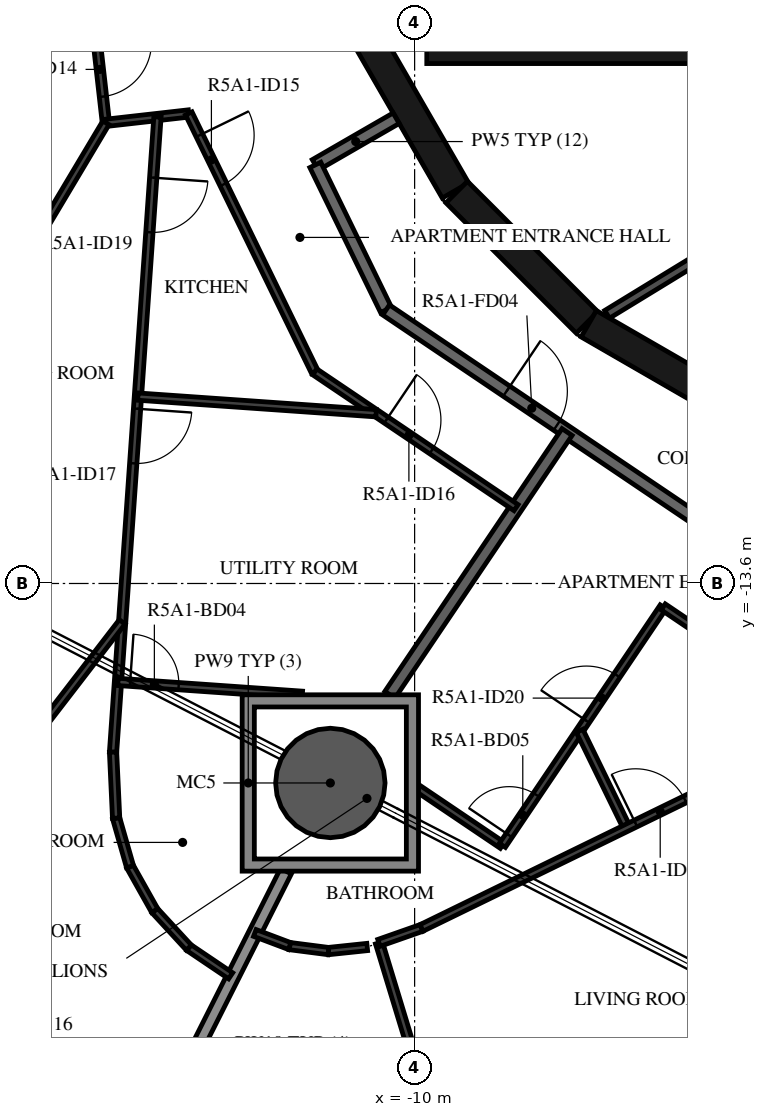
"""IFC4 building model, lengths in metres.
Left out: names, types, materials, properties, quantities, classifications, styles, units other than length and angle.
Written with IfcOpenShell. Run it as: python <this file> out.ifc"""

import sys

from ifc_helpers import new_model, si_unit, direction, frame, frame_2d, origin, origin_2d, place, context, subcontext, project, spatial, polyline, rectangle, hollow_circle, outline, extrude, element, fill, save


model = new_model("IFC4")
c1 = context("Model", 3, precision=1e-05, world=origin(), true_north=direction((0.0, 1.0)))
c2 = subcontext(c1, "Body", "Model", "MODEL_VIEW")
j1 = project(units=[si_unit("LENGTHUNIT", "METRE"), si_unit("PLANEANGLEUNIT", "RADIAN")], contexts=[c1])
p1 = place(None, origin())
s1 = spatial("IfcSite", under=j1, at=p1, CompositionType="ELEMENT")
p2 = place(p1, origin())
s2 = spatial("IfcBuilding", under=s1, at=p2, CompositionType="ELEMENT")
p3 = place(p2, frame((0.0, 0.0, 191.9)))
s3 = spatial("IfcBuildingStorey", under=s2, at=p3, CompositionType="ELEMENT", Elevation=191.9)
p4 = place(p3, frame((-11.386, -16.881, -0.38), z_axis=(0.0, 0.0, 1.0), x_axis=(1.0, 0.0, 0.0)))
e1 = element("IfcColumn", 1, at=p4, inside=s3, PredefinedType="COLUMN", context=c2, shape_type="SweptSolid", body=[
    extrude(hollow_circle(Radius=0.9, WallThickness=0.04, at=origin_2d()), origin(), (0.0, 0.0, 1.0), 3.5),
])
p5 = place(p3, frame((-10.845, -4.51, 0.0), z_axis=(0.0, 0.0, 1.0), x_axis=(0.500087131594, -0.865975092491, 0.0)))
e2 = element("IfcWall", 2, at=p5, inside=s3, PredefinedType="SHEAR", context=c2, shape_type="SweptSolid", body=[
    extrude(rectangle(XDim=3.033, YDim=0.5, at=frame_2d((1.516, 0.0))), origin(), (0.0, 0.0, 1.0), 3.12),
])
p6 = place(p3, frame((-9.308, -7.164, 0.0), z_axis=(0.0, 0.0, 1.0), x_axis=(0.707106781187, -0.707106781187, 0.0)))
e3 = element("IfcWall", 3, at=p6, inside=s3, PredefinedType="SHEAR", context=c2, shape_type="SweptSolid", body=[
    extrude(rectangle(XDim=3.032, YDim=0.5, at=frame_2d((1.516, 0.0))), origin(), (0.0, 0.0, 1.0), 3.12),
])
p7 = place(p3, frame((-7.137, -9.329, 0.0), z_axis=(0.0, 0.0, 1.0), x_axis=(0.865975092491, -0.500087131594, 0.0)))
e4 = element("IfcWall", 4, at=p7, inside=s3, PredefinedType="SHEAR", context=c2, shape_type="SweptSolid", body=[
    extrude(rectangle(XDim=3.033, YDim=0.5, at=frame_2d((1.516, 0.0))), origin(), (0.0, 0.0, 1.0), 3.12),
])
p8 = place(p3, origin())
e5 = element("IfcWall", 5, at=p8, inside=s3, PredefinedType="SHEAR", context=c2, shape_type="SweptSolid", body=[
    extrude(outline(polyline([(9.8, -5.05), (9.8, -4.8), (9.8, -1.9), (9.55, -1.9), (9.55, -4.8), (7.65, -4.8), (7.65, -1.9), (7.4, -1.9), (7.4, -4.8), (5.5, -4.8), (5.5, -1.9), (5.25, -1.9), (5.25, -4.8), (3.35, -4.8), (3.35, -1.9), (3.1, -1.9), (3.1, -4.8), (1.2, -4.8), (1.2, -1.9), (0.95, -1.9), (0.95, -4.8), (-0.95, -4.8), (-0.95, -1.9), (-1.2, -1.9), (-1.2, -4.8), (-3.1, -4.8), (-3.1, -1.9), (-3.35, -1.9), (-3.35, -4.8), (-5.25, -4.8), (-5.25, -1.9), (-5.5, -1.9), (-5.5, -4.8), (-7.4, -4.8), (-7.4, -1.9), (-7.65, -1.9), (-7.65, -4.8), (-9.55, -4.8), (-9.55, -1.9), (-9.8, -1.9), (-9.8, -4.8), (-9.8, -5.05), (9.8, -5.05)])), origin(), (0.0, 0.0, 1.0), 3.12),
])
p9 = place(p3, frame((-2.451, -6.495, 0.0), z_axis=(0.0, 0.0, 1.0), x_axis=(-0.853250115418, -0.521501908471, 0.0)))
e6 = element("IfcWall", 6, at=p9, inside=s3, PredefinedType="PARTITIONING", context=c2, shape_type="SweptSolid", body=[
    extrude(rectangle(XDim=5.137, YDim=0.15, at=frame_2d((2.569, 0.0))), origin(), (0.0, 0.0, 1.0), 3.12),
])
p10 = place(p9, frame((2.119, 0.0, 0.0)))
e7 = element("IfcOpeningElement", 7, at=p10, cuts=e6, PredefinedType="OPENING", context=c2, shape_type="SweptSolid", body=[
    extrude(rectangle(XDim=0.9, YDim=2.1, at=frame_2d((0.45, 1.05))), frame((0.0, 0.085, 0.0), z_axis=(0.0, -1.0, 0.0), x_axis=(1.0, 0.0, 0.0)), (0.0, 0.0, 1.0), 0.17),
])
p11 = place(p3, frame((-10.303, -5.949, 0.0), z_axis=(0.0, 0.0, 1.0), x_axis=(-0.866042588199, -0.499970234539, 0.0)))
e8 = element("IfcWall", 8, at=p11, inside=s3, PredefinedType="STANDARD", context=c2, shape_type="SweptSolid", body=[
    extrude(rectangle(XDim=1.535, YDim=0.2, at=frame_2d((0.768, 0.0))), origin(), (0.0, 0.0, 1.0), 3.12),
])
p12 = place(p3, frame((-11.633, -6.716, 0.0), z_axis=(0.0, 0.0, 1.0), x_axis=(0.438322116278, -0.898817958422, 0.0)))
e9 = element("IfcWall", 9, at=p12, inside=s3, PredefinedType="STANDARD", context=c2, shape_type="SweptSolid", body=[
    extrude(rectangle(XDim=2.654, YDim=0.2, at=frame_2d((1.327, 0.0))), origin(), (0.0, 0.0, 1.0), 3.12),
])
p13 = place(p3, frame((-10.47, -9.101, 0.0), z_axis=(0.0, 0.0, 1.0), x_axis=(0.829035841718, -0.559195469534, 0.0)))
e10 = element("IfcWall", 10, at=p13, inside=s3, PredefinedType="STANDARD", context=c2, shape_type="SweptSolid", body=[
    extrude(rectangle(XDim=7.181, YDim=0.2, at=frame_2d((3.591, 0.0))), origin(), (0.0, 0.0, 1.0), 3.12),
])
p14 = place(p13, frame((2.39, 0.0, 0.0)))
e11 = element("IfcOpeningElement", 11, at=p14, cuts=e10, PredefinedType="OPENING", context=c2, shape_type="SweptSolid", body=[
    extrude(rectangle(XDim=1.0, YDim=2.1, at=frame_2d((0.5, 1.05))), frame((0.0, 0.11, 0.0), z_axis=(0.0, -1.0, 0.0), x_axis=(1.0, 0.0, 0.0)), (0.0, 0.0, 1.0), 0.22),
])
p15 = place(p3, frame((-10.407, -15.43, 0.0), z_axis=(0.0, 0.0, 1.0), x_axis=(0.559038328133, 0.829141813973, 0.0)))
e12 = element("IfcWall", 12, at=p15, inside=s3, PredefinedType="STANDARD", context=c2, shape_type="SweptSolid", body=[
    extrude(rectangle(XDim=5.212, YDim=0.2, at=frame_2d((2.606, 0.0))), origin(), (0.0, 0.0, 1.0), 3.12),
])
p16 = place(p3, frame((-14.979, -24.017, 0.0), z_axis=(0.0, 0.0, 1.0), x_axis=(0.449711952388, 0.893173644864, 0.0)))
e13 = element("IfcWall", 13, at=p16, inside=s3, PredefinedType="STANDARD", context=c2, shape_type="SweptSolid", body=[
    extrude(rectangle(XDim=6.367, YDim=0.2, at=frame_2d((3.184, 0.0))), origin(), (0.0, 0.0, 1.0), 2.73),
])
p17 = place(p3, frame((-15.25, -4.5, 0.0), z_axis=(0.0, 0.0, 1.0), x_axis=(0.1124919794, -0.99365263275, 0.0)))
e14 = element("IfcWall", 14, at=p17, inside=s3, PredefinedType="PARTITIONING", context=c2, shape_type="SweptSolid", body=[
    extrude(rectangle(XDim=1.534, YDim=0.12, at=frame_2d((0.767, 0.0))), origin(), (0.0, 0.0, 1.0), 3.12),
])
p18 = place(p17, frame((0.2, 0.0, 0.0)))
e15 = element("IfcOpeningElement", 15, at=p18, cuts=e14, PredefinedType="OPENING", context=c2, shape_type="SweptSolid", body=[
    extrude(rectangle(XDim=0.9, YDim=2.1, at=frame_2d((0.45, 1.05))), frame((0.0, 0.07, 0.0), z_axis=(0.0, -1.0, 0.0), x_axis=(1.0, 0.0, 0.0)), (0.0, 0.0, 1.0), 0.14),
])
p19 = place(p3, frame((-15.077, -6.025, 0.0), z_axis=(0.0, 0.0, 1.0), x_axis=(0.993646958109, 0.112542092746, 0.0)))
e16 = element("IfcWall", 16, at=p19, inside=s3, PredefinedType="PARTITIONING", context=c2, shape_type="SweptSolid", body=[
    extrude(rectangle(XDim=1.371, YDim=0.12, at=frame_2d((0.686, 0.0))), origin(), (0.0, 0.0, 1.0), 3.12),
])
p20 = place(p3, frame((-13.715, -5.87, 0.0), z_axis=(0.0, 0.0, 1.0), x_axis=(0.438372766482, -0.89879325632, 0.0)))
e17 = element("IfcWall", 17, at=p20, inside=s3, PredefinedType="PARTITIONING", context=c2, shape_type="SweptSolid", body=[
    extrude(rectangle(XDim=4.728, YDim=0.12, at=frame_2d((2.364, 0.0))), origin(), (0.0, 0.0, 1.0), 3.12),
])
p21 = place(p20, frame((0.4, 0.0, 0.0)))
e18 = element("IfcOpeningElement", 18, at=p21, cuts=e17, PredefinedType="OPENING", context=c2, shape_type="SweptSolid", body=[
    extrude(rectangle(XDim=0.9, YDim=2.1, at=frame_2d((0.45, 1.05))), frame((0.0, 0.07, 0.0), z_axis=(0.0, -1.0, 0.0), x_axis=(1.0, 0.0, 0.0)), (0.0, 0.0, 1.0), 0.14),
])
p22 = place(p3, frame((-11.642, -10.12, 0.0), z_axis=(0.0, 0.0, 1.0), x_axis=(0.829018066952, -0.559221820629, 0.0)))
e19 = element("IfcWall", 19, at=p22, inside=s3, PredefinedType="PARTITIONING", context=c2, shape_type="SweptSolid", body=[
    extrude(rectangle(XDim=3.992, YDim=0.12, at=frame_2d((1.996, 0.0))), origin(), (0.0, 0.0, 1.0), 3.12),
])
p23 = place(p22, frame((1.417, 0.0, 0.0)))
e20 = element("IfcOpeningElement", 20, at=p23, cuts=e19, PredefinedType="OPENING", context=c2, shape_type="SweptSolid", body=[
    extrude(rectangle(XDim=0.9, YDim=2.1, at=frame_2d((0.45, 1.05))), frame((0.0, 0.07, 0.0), z_axis=(0.0, -1.0, 0.0), x_axis=(1.0, 0.0, 0.0)), (0.0, 0.0, 1.0), 0.14),
])
p24 = place(p3, frame((-19.156, -12.863, 0.0), z_axis=(0.0, 0.0, 1.0), x_axis=(0.512316386407, 0.858796786335, 0.0)))
e21 = element("IfcWall", 21, at=p24, inside=s3, PredefinedType="PARTITIONING", context=c2, shape_type="SweptSolid", body=[
    extrude(rectangle(XDim=7.963, YDim=0.12, at=frame_2d((3.981, 0.0))), origin(), (0.0, 0.0, 1.0), 3.12),
])
p25 = place(p3, frame((-14.229, -5.929, 0.0), z_axis=(0.0, 0.0, 1.0), x_axis=(-0.069740723375, -0.997565151508, 0.0)))
e22 = element("IfcWall", 22, at=p25, inside=s3, PredefinedType="PARTITIONING", context=c2, shape_type="SweptSolid", body=[
    extrude(rectangle(XDim=10.47, YDim=0.12, at=frame_2d((5.235, 0.0))), origin(), (0.0, 0.0, 1.0), 3.12),
])
p26 = place(p25, frame((4.809, 0.0, 0.0)))
e23 = element("IfcOpeningElement", 23, at=p26, cuts=e22, PredefinedType="OPENING", context=c2, shape_type="SweptSolid", body=[
    extrude(rectangle(XDim=0.9, YDim=2.1, at=frame_2d((0.45, 1.05))), frame((0.0, 0.07, 0.0), z_axis=(0.0, -1.0, 0.0), x_axis=(1.0, 0.0, 0.0)), (0.0, 0.0, 1.0), 0.14),
])
p27 = place(p25, frame((1.0, 0.0, 0.0)))
e24 = element("IfcOpeningElement", 24, at=p27, cuts=e22, PredefinedType="OPENING", context=c2, shape_type="SweptSolid", body=[
    extrude(rectangle(XDim=0.9, YDim=2.1, at=frame_2d((0.45, 1.05))), frame((0.0, 0.07, 0.0), z_axis=(0.0, -1.0, 0.0), x_axis=(1.0, 0.0, 0.0)), (0.0, 0.0, 1.0), 0.14),
])
p28 = place(p3, frame((-14.551, -10.527, 0.0), z_axis=(0.0, 0.0, 1.0), x_axis=(0.997564247633, -0.069753651118, 0.0)))
e25 = element("IfcWall", 25, at=p28, inside=s3, PredefinedType="PARTITIONING", context=c2, shape_type="SweptSolid", body=[
    extrude(rectangle(XDim=3.927, YDim=0.12, at=frame_2d((1.963, 0.0))), origin(), (0.0, 0.0, 1.0), 3.12),
])
p29 = place(p3, frame((-18.892, -19.531, 0.0), z_axis=(0.0, 0.0, 1.0), x_axis=(0.610326128317, 0.792150249065, 0.0)))
e26 = element("IfcWall", 26, at=p29, inside=s3, PredefinedType="PARTITIONING", context=c2, shape_type="SweptSolid", body=[
    extrude(rectangle(XDim=6.689, YDim=0.12, at=frame_2d((3.345, 0.0))), origin(), (0.0, 0.0, 1.0), 3.12),
])
p30 = place(p29, frame((0.6, 0.0, 0.0)))
e27 = element("IfcOpeningElement", 27, at=p30, cuts=e26, PredefinedType="OPENING", context=c2, shape_type="SweptSolid", body=[
    extrude(rectangle(XDim=0.9, YDim=2.1, at=frame_2d((0.45, 1.05))), frame((0.0, 0.07, 0.0), z_axis=(0.0, -1.0, 0.0), x_axis=(1.0, 0.0, 0.0)), (0.0, 0.0, 1.0), 0.14),
])
p31 = place(p3, frame((-14.879, -15.219, 0.0), z_axis=(0.0, 0.0, 1.0), x_axis=(0.997566012813, -0.069728402248, 0.0)))
e28 = element("IfcWall", 28, at=p31, inside=s3, PredefinedType="PARTITIONING", context=c2, shape_type="SweptSolid", body=[
    extrude(rectangle(XDim=3.039, YDim=0.12, at=frame_2d((1.52, 0.0))), origin(), (0.0, 0.0, 1.0), 3.12),
])
p32 = place(p31, frame((0.2, 0.0, 0.0)))
e29 = element("IfcOpeningElement", 29, at=p32, cuts=e28, PredefinedType="OPENING", context=c2, shape_type="SweptSolid", body=[
    extrude(rectangle(XDim=0.8, YDim=2.1, at=frame_2d((0.4, 1.05))), frame((0.0, 0.07, 0.0), z_axis=(0.0, -1.0, 0.0), x_axis=(1.0, 0.0, 0.0)), (0.0, 0.0, 1.0), 0.14),
])
for number, where, z_axis, x_axis in (
    (30, (-13.025, -20.052, 0.0), (0.0, 0.0, 1.0), (-0.829, 0.559, 0.0)),
    (31, (-13.712, -19.588, 0.0), (0.0, 0.0, 1.0), (-0.678, 0.735, 0.0)),
):
    element("IfcWall", number, at=place(p3, frame(where, z_axis=z_axis, x_axis=x_axis)), inside=s3, PredefinedType="PARTITIONING", context=c2, shape_type="SweptSolid", body=[
        extrude(rectangle(XDim=0.829, YDim=0.12, at=frame_2d((0.415, 0.0))), origin(), (0.0, 0.0, 1.0), 3.12),
    ])
p33 = place(p3, frame((-14.274, -18.979, 0.0), z_axis=(0.0, 0.0, 1.0), x_axis=(-0.490037513137, 0.871701345484, 0.0)))
e32 = element("IfcWall", 32, at=p33, inside=s3, PredefinedType="PARTITIONING", context=c2, shape_type="SweptSolid", body=[
    extrude(rectangle(XDim=0.829, YDim=0.12, at=frame_2d((0.415, 0.0))), origin(), (0.0, 0.0, 1.0), 3.12),
])
p34 = place(p3, frame((-14.68, -18.256, 0.0), z_axis=(0.0, 0.0, 1.0), x_axis=(-0.275382358468, 0.961334778651, 0.0)))
e33 = element("IfcWall", 33, at=p34, inside=s3, PredefinedType="PARTITIONING", context=c2, shape_type="SweptSolid", body=[
    extrude(rectangle(XDim=0.829, YDim=0.12, at=frame_2d((0.415, 0.0))), origin(), (0.0, 0.0, 1.0), 3.12),
])
p35 = place(p3, frame((-14.909, -17.459, 0.0), z_axis=(0.0, 0.0, 1.0), x_axis=(-0.046497887649, 0.99891838828, 0.0)))
e34 = element("IfcWall", 34, at=p35, inside=s3, PredefinedType="PARTITIONING", context=c2, shape_type="SweptSolid", body=[
    extrude(rectangle(XDim=1.087, YDim=0.12, at=frame_2d((0.543, 0.0))), origin(), (0.0, 0.0, 1.0), 3.12),
])
p36 = place(p3, frame((-9.936, -16.976, 0.0), z_axis=(0.0, 0.0, 1.0), x_axis=(0.829057888835, -0.559162782167, 0.0)))
e35 = element("IfcWall", 35, at=p36, inside=s3, PredefinedType="PARTITIONING", context=c2, shape_type="SweptSolid", body=[
    extrude(rectangle(XDim=1.664, YDim=0.12, at=frame_2d((0.832, 0.0))), origin(), (0.0, 0.0, 1.0), 3.12),
])
p37 = place(p3, frame((-8.557, -17.906, 0.0), z_axis=(0.0, 0.0, 1.0), x_axis=(0.559194471553, 0.829036514868, 0.0)))
e36 = element("IfcWall", 36, at=p37, inside=s3, PredefinedType="PARTITIONING", context=c2, shape_type="SweptSolid", body=[
    extrude(rectangle(XDim=4.73, YDim=0.12, at=frame_2d((2.365, 0.0))), origin(), (0.0, 0.0, 1.0), 3.12),
])
p38 = place(p37, frame((0.2, 0.0, 0.0)))
e37 = element("IfcOpeningElement", 37, at=p38, cuts=e36, PredefinedType="OPENING", context=c2, shape_type="SweptSolid", body=[
    extrude(rectangle(XDim=0.8, YDim=2.1, at=frame_2d((0.4, 1.05))), frame((0.0, 0.07, 0.0), z_axis=(0.0, -1.0, 0.0), x_axis=(1.0, 0.0, 0.0)), (0.0, 0.0, 1.0), 0.14),
])
p39 = place(p37, frame((2.471, 0.0, 0.0)))
e38 = element("IfcOpeningElement", 38, at=p39, cuts=e36, PredefinedType="OPENING", context=c2, shape_type="SweptSolid", body=[
    extrude(rectangle(XDim=0.9, YDim=2.1, at=frame_2d((0.45, 1.05))), frame((0.0, 0.07, 0.0), z_axis=(0.0, -1.0, 0.0), x_axis=(1.0, 0.0, 0.0)), (0.0, 0.0, 1.0), 0.14),
])
p40 = place(p3, frame((-5.912, -13.985, 0.0), z_axis=(0.0, 0.0, 1.0), x_axis=(0.829027978444, -0.559207127062, 0.0)))
e39 = element("IfcWall", 39, at=p40, inside=s3, PredefinedType="PARTITIONING", context=c2, shape_type="SweptSolid", body=[
    extrude(rectangle(XDim=1.073, YDim=0.12, at=frame_2d((0.537, 0.0))), origin(), (0.0, 0.0, 1.0), 3.12),
])
p41 = place(p3, frame((-10.78, -19.578, 0.0), z_axis=(0.0, 0.0, 1.0), x_axis=(-0.994515867502, -0.104585798686, 0.0)))
e40 = element("IfcWall", 40, at=p41, inside=s3, PredefinedType="PARTITIONING", context=c2, shape_type="SweptSolid", body=[
    extrude(rectangle(XDim=0.642, YDim=0.12, at=frame_2d((0.321, 0.0))), origin(), (0.0, 0.0, 1.0), 3.12),
])
p42 = place(p3, frame((-11.418, -19.645, 0.0), z_axis=(0.0, 0.0, 1.0), x_axis=(-0.991802759529, 0.127778269633, 0.0)))
e41 = element("IfcWall", 41, at=p42, inside=s3, PredefinedType="PARTITIONING", context=c2, shape_type="SweptSolid", body=[
    extrude(rectangle(XDim=0.642, YDim=0.12, at=frame_2d((0.321, 0.0))), origin(), (0.0, 0.0, 1.0), 3.12),
])
p43 = place(p3, frame((-12.055, -19.563, 0.0), z_axis=(0.0, 0.0, 1.0), x_axis=(-0.935507243946, 0.353307509862, 0.0)))
e42 = element("IfcWall", 42, at=p43, inside=s3, PredefinedType="PARTITIONING", context=c2, shape_type="SweptSolid", body=[
    extrude(rectangle(XDim=0.612, YDim=0.12, at=frame_2d((0.306, 0.0))), origin(), (0.0, 0.0, 1.0), 3.12),
])
p44 = place(p3, frame((-9.072, -24.489, 0.0), z_axis=(0.0, 0.0, 1.0), x_axis=(-0.291025348593, 0.956715342449, 0.0)))
e43 = element("IfcWall", 43, at=p44, inside=s3, PredefinedType="PARTITIONING", context=c2, shape_type="SweptSolid", body=[
    extrude(rectangle(XDim=5.205, YDim=0.12, at=frame_2d((2.602, 0.0))), origin(), (0.0, 0.0, 1.0), 3.12),
])
p45 = place(p44, frame((0.2, 0.0, 0.0)))
e44 = element("IfcOpeningElement", 44, at=p45, cuts=e43, PredefinedType="OPENING", context=c2, shape_type="SweptSolid", body=[
    extrude(rectangle(XDim=0.9, YDim=2.1, at=frame_2d((0.45, 1.05))), frame((0.0, 0.07, 0.0), z_axis=(0.0, -1.0, 0.0), x_axis=(1.0, 0.0, 0.0)), (0.0, 0.0, 1.0), 0.14),
])
p46 = place(p3, frame((-6.51, -17.617, 0.0), z_axis=(0.0, 0.0, 1.0), x_axis=(-0.438380229518, 0.898789616299, 0.0)))
e45 = element("IfcWall", 45, at=p46, inside=s3, PredefinedType="PARTITIONING", context=c2, shape_type="SweptSolid", body=[
    extrude(rectangle(XDim=1.773, YDim=0.12, at=frame_2d((0.887, 0.0))), origin(), (0.0, 0.0, 1.0), 3.12),
])
p47 = place(p3, frame((-10.586, -19.51, 0.0), z_axis=(0.0, 0.0, 1.0), x_axis=(0.943560277016, 0.3312008509, 0.0)))
e46 = element("IfcWall", 46, at=p47, inside=s3, PredefinedType="PARTITIONING", context=c2, shape_type="SweptSolid", body=[
    extrude(rectangle(XDim=0.741, YDim=0.12, at=frame_2d((0.371, 0.0))), origin(), (0.0, 0.0, 1.0), 3.12),
])
p48 = place(p3, frame((-9.886, -19.264, 0.0), z_axis=(0.0, 0.0, 1.0), x_axis=(0.898796326112, 0.43836647245, 0.0)))
e47 = element("IfcWall", 47, at=p48, inside=s3, PredefinedType="PARTITIONING", context=c2, shape_type="SweptSolid", body=[
    extrude(rectangle(XDim=10.014, YDim=0.12, at=frame_2d((5.007, 0.0))), origin(), (0.0, 0.0, 1.0), 3.12),
])
p49 = place(p48, frame((3.917, 0.0, 0.0)))
e48 = element("IfcOpeningElement", 48, at=p49, cuts=e47, PredefinedType="OPENING", context=c2, shape_type="SweptSolid", body=[
    extrude(rectangle(XDim=0.9, YDim=2.1, at=frame_2d((0.45, 1.05))), frame((0.0, 0.07, 0.0), z_axis=(0.0, -1.0, 0.0), x_axis=(1.0, 0.0, 0.0)), (0.0, 0.0, 1.0), 0.14),
])
p50 = place(p3, origin())
e49 = element("IfcWall", 49, at=p50, inside=s3, PredefinedType="STANDARD", context=c2, shape_type="SweptSolid", body=[
    extrude(outline(polyline([(-9.936, -15.43), (-9.936, -18.331), (-12.836, -18.331), (-12.836, -15.43), (-9.936, -15.43)]), holes=[polyline([(-12.636, -18.131), (-10.136, -18.131), (-10.136, -15.631), (-12.636, -15.631), (-12.636, -18.131)])]), origin(), (0.0, 0.0, 1.0), 3.12),
])
p51 = place(p14, origin())
e50 = element("IfcDoor", 50, at=p51, inside=s3, OperationType="SINGLE_SWING_RIGHT", PredefinedType="DOOR", context=c2, shape_type="SweptSolid", body=[
    extrude(rectangle(XDim=1.0, YDim=2.1, at=frame_2d((0.5, 1.05))), frame((0.0, 0.025, 0.0), z_axis=(0.0, -1.0, 0.0), x_axis=(1.0, 0.0, 0.0)), (0.0, 0.0, 1.0), 0.05),
])
fill(e11, e50)
p52 = place(p18, origin())
e51 = element("IfcDoor", 51, at=p52, inside=s3, OperationType="SINGLE_SWING_RIGHT", PredefinedType="DOOR", context=c2, shape_type="SweptSolid", body=[
    extrude(rectangle(XDim=0.9, YDim=2.1, at=frame_2d((0.45, 1.05))), frame((0.0, 0.025, 0.0), z_axis=(0.0, -1.0, 0.0), x_axis=(1.0, 0.0, 0.0)), (0.0, 0.0, 1.0), 0.05),
])
fill(e15, e51)
p53 = place(p21, origin())
e52 = element("IfcDoor", 52, at=p53, inside=s3, OperationType="SINGLE_SWING_RIGHT", PredefinedType="DOOR", context=c2, shape_type="SweptSolid", body=[
    extrude(rectangle(XDim=0.9, YDim=2.1, at=frame_2d((0.45, 1.05))), frame((0.0, 0.025, 0.0), z_axis=(0.0, -1.0, 0.0), x_axis=(1.0, 0.0, 0.0)), (0.0, 0.0, 1.0), 0.05),
])
fill(e18, e52)
p54 = place(p23, origin())
e53 = element("IfcDoor", 53, at=p54, inside=s3, OperationType="SINGLE_SWING_RIGHT", PredefinedType="DOOR", context=c2, shape_type="SweptSolid", body=[
    extrude(rectangle(XDim=0.9, YDim=2.1, at=frame_2d((0.45, 1.05))), frame((0.0, 0.025, 0.0), z_axis=(0.0, -1.0, 0.0), x_axis=(1.0, 0.0, 0.0)), (0.0, 0.0, 1.0), 0.05),
])
fill(e20, e53)
p55 = place(p26, origin())
e54 = element("IfcDoor", 54, at=p55, inside=s3, OperationType="SINGLE_SWING_RIGHT", PredefinedType="DOOR", context=c2, shape_type="SweptSolid", body=[
    extrude(rectangle(XDim=0.9, YDim=2.1, at=frame_2d((0.45, 1.05))), frame((0.0, 0.025, 0.0), z_axis=(0.0, -1.0, 0.0), x_axis=(1.0, 0.0, 0.0)), (0.0, 0.0, 1.0), 0.05),
])
fill(e23, e54)
p56 = place(p32, origin())
e55 = element("IfcDoor", 55, at=p56, inside=s3, OperationType="SINGLE_SWING_RIGHT", PredefinedType="DOOR", context=c2, shape_type="SweptSolid", body=[
    extrude(rectangle(XDim=0.8, YDim=2.1, at=frame_2d((0.4, 1.05))), frame((0.0, 0.025, 0.0), z_axis=(0.0, -1.0, 0.0), x_axis=(1.0, 0.0, 0.0)), (0.0, 0.0, 1.0), 0.05),
])
fill(e29, e55)
p57 = place(p27, origin())
e56 = element("IfcDoor", 56, at=p57, inside=s3, OperationType="SINGLE_SWING_LEFT", PredefinedType="DOOR", context=c2, shape_type="SweptSolid", body=[
    extrude(rectangle(XDim=0.9, YDim=2.1, at=frame_2d((0.45, 1.05))), frame((0.0, 0.025, 0.0), z_axis=(0.0, -1.0, 0.0), x_axis=(1.0, 0.0, 0.0)), (0.0, 0.0, 1.0), 0.05),
])
fill(e24, e56)
p58 = place(p38, origin())
e57 = element("IfcDoor", 57, at=p58, inside=s3, OperationType="SINGLE_SWING_LEFT", PredefinedType="DOOR", context=c2, shape_type="SweptSolid", body=[
    extrude(rectangle(XDim=0.8, YDim=2.1, at=frame_2d((0.4, 1.05))), frame((0.0, 0.025, 0.0), z_axis=(0.0, -1.0, 0.0), x_axis=(1.0, 0.0, 0.0)), (0.0, 0.0, 1.0), 0.05),
])
fill(e37, e57)
p59 = place(p39, origin())
e58 = element("IfcDoor", 58, at=p59, inside=s3, OperationType="SINGLE_SWING_LEFT", PredefinedType="DOOR", context=c2, shape_type="SweptSolid", body=[
    extrude(rectangle(XDim=0.9, YDim=2.1, at=frame_2d((0.45, 1.05))), frame((0.0, 0.025, 0.0), z_axis=(0.0, -1.0, 0.0), x_axis=(1.0, 0.0, 0.0)), (0.0, 0.0, 1.0), 0.05),
])
fill(e38, e58)
p60 = place(p49, origin())
e59 = element("IfcDoor", 59, at=p60, inside=s3, OperationType="SINGLE_SWING_LEFT", PredefinedType="DOOR", context=c2, shape_type="SweptSolid", body=[
    extrude(rectangle(XDim=0.9, YDim=2.1, at=frame_2d((0.45, 1.05))), frame((0.0, 0.025, 0.0), z_axis=(0.0, -1.0, 0.0), x_axis=(1.0, 0.0, 0.0)), (0.0, 0.0, 1.0), 0.05),
])
fill(e48, e59)
save(model, sys.argv[1])
